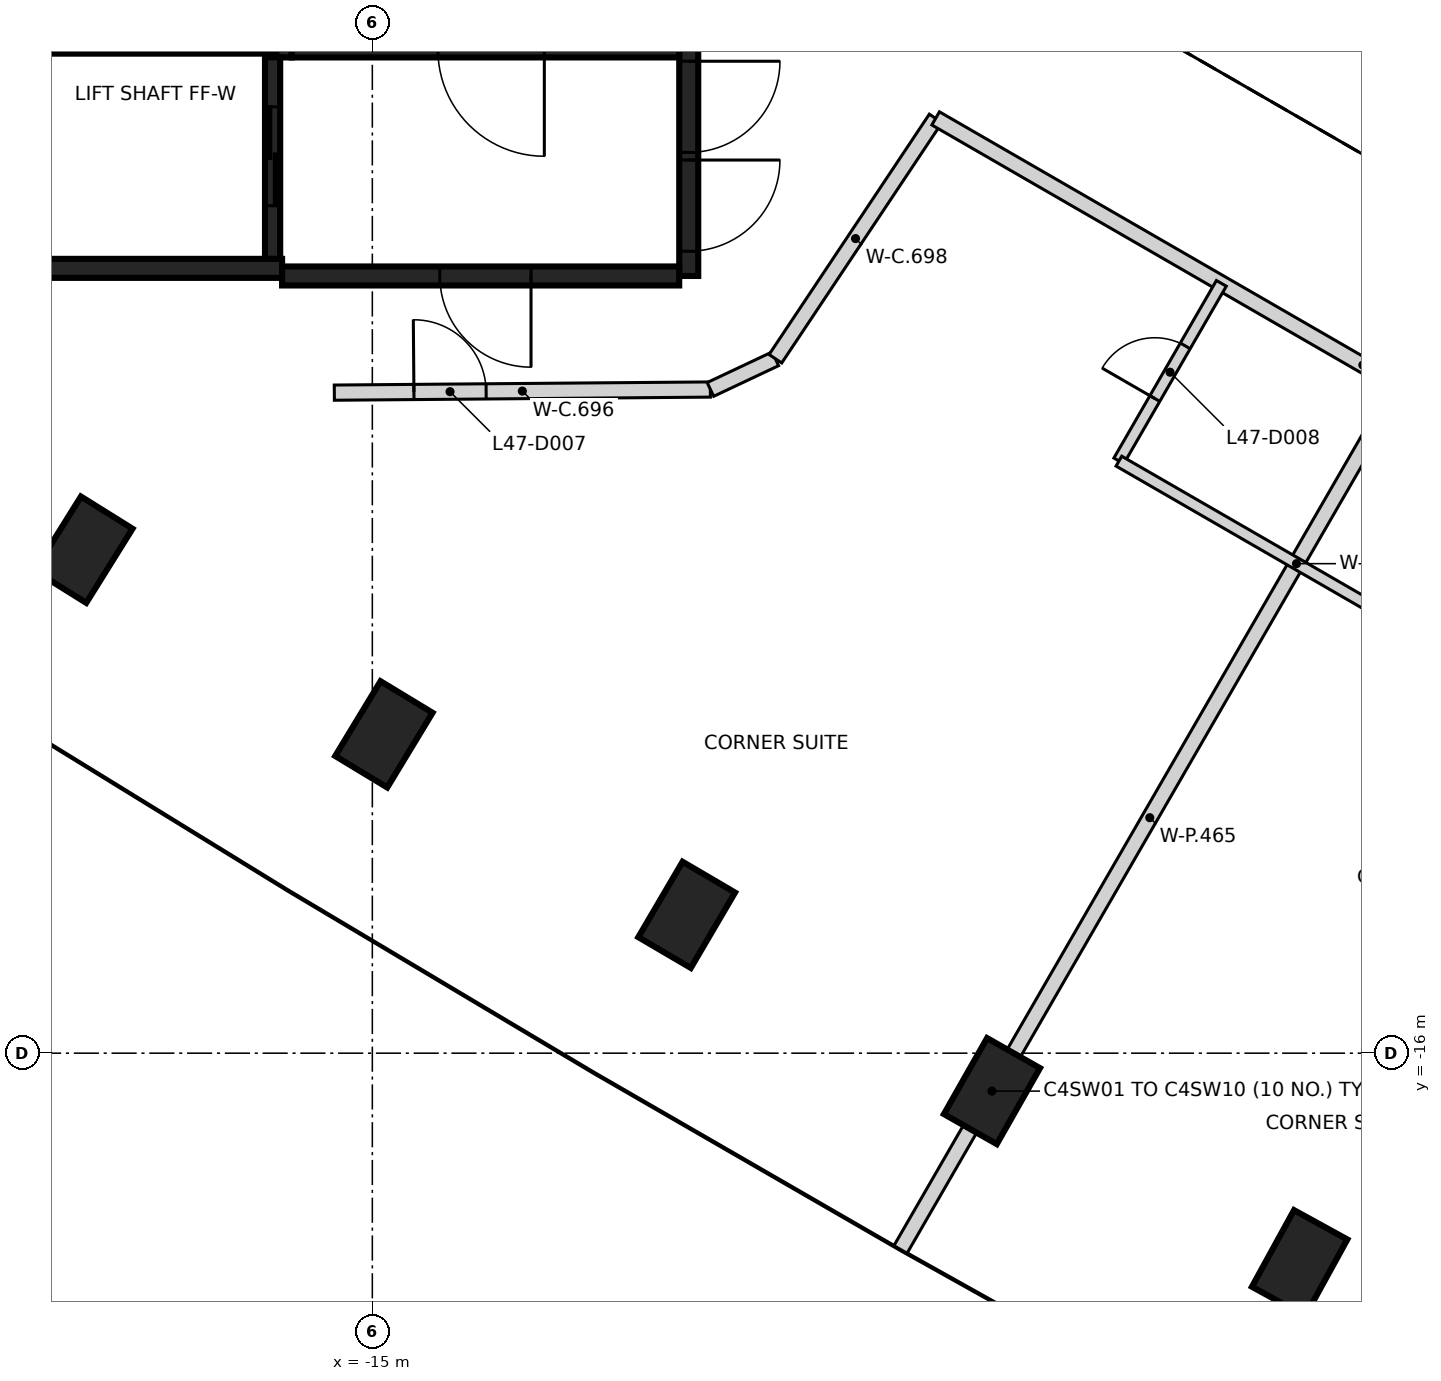
"""IFC4 building model, lengths in metres.
Left out: names, types, materials, properties, quantities, classifications, styles, units other than length and angle.
Written with IfcOpenShell. Run it as: python <this file> out.ifc"""

import sys

from ifc_helpers import new_model, si_unit, direction, frame, frame_2d, origin, origin_2d, place, context, subcontext, project, spatial, rectangle, extrude, element, fill, save


model = new_model("IFC4")
c1 = context("Model", 3, precision=1e-05, world=origin(), true_north=direction((0.0, 1.0)))
c2 = subcontext(c1, "Body", "Model", "MODEL_VIEW")
j1 = project(units=[si_unit("LENGTHUNIT", "METRE"), si_unit("PLANEANGLEUNIT", "RADIAN")], contexts=[c1])
p1 = place(None, origin())
s1 = spatial("IfcSite", under=j1, at=p1, CompositionType="ELEMENT")
p2 = place(p1, origin())
s2 = spatial("IfcBuilding", under=s1, at=p2, CompositionType="ELEMENT")
p3 = place(p2, frame((0.0, 0.0, 190.0)))
s3 = spatial("IfcBuildingStorey", under=s2, at=p3, CompositionType="ELEMENT", Elevation=190.0)
for number, where, z_axis, x_axis in (
    (1, (-18.799, -9.376, -0.35), (0.0, 0.0, 1.0), (0.529, 0.848, 0.0)),
    (2, (-14.848, -11.806, -0.35), (0.0, 0.0, 1.0), (0.518, 0.855, 0.0)),
    (3, (-10.864, -14.18, -0.35), (0.0, 0.0, 1.0), (0.506, 0.862, 0.0)),
    (4, (-6.848, -16.499, -0.35), (0.0, 0.0, 1.0), (0.494, 0.87, 0.0)),
    (5, (-2.8, -18.762, -0.35), (0.0, 0.0, 1.0), (0.482, 0.876, 0.0)),
):
    element("IfcColumn", number, at=place(p3, frame(where, z_axis=z_axis, x_axis=x_axis)), inside=s3, PredefinedType="COLUMN", context=c2, shape_type="SweptSolid", body=[
        extrude(rectangle(XDim=1.15, YDim=0.8, at=origin_2d()), origin(), (0.0, 0.0, 1.0), 3.6),
    ])
p4 = place(p3, frame((-10.837, 5.775, 0.0), z_axis=(0.0, 0.0, 1.0), x_axis=(0.0, -1.0, 0.0)))
e6 = element("IfcWall", 6, at=p4, inside=s3, PredefinedType="SHEAR", context=c2, shape_type="SweptSolid", body=[
    extrude(rectangle(XDim=11.55, YDim=0.25, at=frame_2d((5.775, 0.0))), origin(), (0.0, 0.0, 1.0), 3.25),
])
p5 = place(p4, frame((10.025, 0.0, 0.0)))
e7 = element("IfcOpeningElement", 7, at=p5, cuts=e6, PredefinedType="OPENING", context=c2, shape_type="SweptSolid", body=[
    extrude(rectangle(XDim=1.2, YDim=2.1, at=frame_2d((0.6, 1.05))), frame((0.0, 0.135, 0.0), z_axis=(0.0, -1.0, 0.0), x_axis=(1.0, 0.0, 0.0)), (0.0, 0.0, 1.0), 0.27),
])
p6 = place(p4, frame((8.725, 0.0, 0.0)))
e8 = element("IfcOpeningElement", 8, at=p6, cuts=e6, PredefinedType="OPENING", context=c2, shape_type="SweptSolid", body=[
    extrude(rectangle(XDim=1.2, YDim=2.1, at=frame_2d((0.6, 1.05))), frame((0.0, 0.135, 0.0), z_axis=(0.0, -1.0, 0.0), x_axis=(1.0, 0.0, 0.0)), (0.0, 0.0, 1.0), 0.27),
])
p7 = place(p3, frame((-16.187, -5.675, 0.0), z_axis=(0.0, 0.0, 1.0), x_axis=(-1.0, 0.0, 0.0)))
e9 = element("IfcWall", 9, at=p7, inside=s3, PredefinedType="SHEAR", context=c2, shape_type="SweptSolid", body=[
    extrude(rectangle(XDim=6.125, YDim=0.25, at=frame_2d((3.062, 0.0))), origin(), (0.0, 0.0, 1.0), 3.25),
])
p8 = place(p7, frame((3.563, 0.0, 0.0)))
e10 = element("IfcOpeningElement", 10, at=p8, cuts=e9, PredefinedType="OPENING", context=c2, shape_type="SweptSolid", body=[
    extrude(rectangle(XDim=1.0, YDim=2.1, at=frame_2d((0.5, 1.05))), frame((0.0, 0.135, 0.0), z_axis=(0.0, -1.0, 0.0), x_axis=(1.0, 0.0, 0.0)), (0.0, 0.0, 1.0), 0.27),
])
p9 = place(p3, frame((-10.963, -5.775, 0.0), z_axis=(0.0, 0.0, 1.0), x_axis=(-1.0, 0.0, 0.0)))
e11 = element("IfcWall", 11, at=p9, inside=s3, PredefinedType="SHEAR", context=c2, shape_type="SweptSolid", body=[
    extrude(rectangle(XDim=5.225, YDim=0.25, at=frame_2d((2.612, 0.0))), origin(), (0.0, 0.0, 1.0), 3.25),
])
p10 = place(p9, frame((1.95, 0.0, 0.0)))
e12 = element("IfcOpeningElement", 12, at=p10, cuts=e11, PredefinedType="OPENING", context=c2, shape_type="SweptSolid", body=[
    extrude(rectangle(XDim=1.2, YDim=2.1, at=frame_2d((0.6, 1.05))), frame((0.0, 0.135, 0.0), z_axis=(0.0, -1.0, 0.0), x_axis=(1.0, 0.0, 0.0)), (0.0, 0.0, 1.0), 0.27),
])
p11 = place(p3, frame((-16.162, 3.074, 0.0), z_axis=(0.0, 0.0, 1.0), x_axis=(0.0, -1.0, 0.0)))
e13 = element("IfcWall", 13, at=p11, inside=s3, PredefinedType="SHEAR", context=c2, shape_type="SweptSolid", body=[
    extrude(rectangle(XDim=5.974, YDim=0.2, at=frame_2d((2.987, 0.0))), origin(), (0.0, 0.0, 1.0), 3.25),
])
p12 = place(p3, frame((-10.963, -2.8, 0.0), z_axis=(0.0, 0.0, 1.0), x_axis=(-1.0, 0.0, 0.0)))
e14 = element("IfcWall", 14, at=p12, inside=s3, PredefinedType="SHEAR", context=c2, shape_type="SweptSolid", body=[
    extrude(rectangle(XDim=5.098, YDim=0.2, at=frame_2d((2.549, 0.0))), origin(), (0.0, 0.0, 1.0), 3.25),
])
p13 = place(p12, frame((1.774, 0.0, 0.0)))
e15 = element("IfcOpeningElement", 15, at=p13, cuts=e14, PredefinedType="OPENING", context=c2, shape_type="SweptSolid", body=[
    extrude(rectangle(XDim=1.4, YDim=2.1, at=frame_2d((0.7, 1.05))), frame((0.0, 0.11, 0.0), z_axis=(0.0, -1.0, 0.0), x_axis=(1.0, 0.0, 0.0)), (0.0, 0.0, 1.0), 0.22),
])
p14 = place(p3, frame((-19.412, -2.75, 0.0), z_axis=(0.0, 0.0, 1.0), x_axis=(1.0, 0.0, 0.0)))
e16 = element("IfcWall", 16, at=p14, inside=s3, PredefinedType="SHEAR", context=c2, shape_type="SweptSolid", body=[
    extrude(rectangle(XDim=3.1, YDim=0.2, at=frame_2d((1.55, 0.0))), origin(), (0.0, 0.0, 1.0), 3.25),
])
p15 = place(p3, frame((-16.312, -2.898, 0.0), z_axis=(0.0, 0.0, 1.0), x_axis=(0.0, -1.0, 0.0)))
e17 = element("IfcWall", 17, at=p15, inside=s3, PredefinedType="SHEAR", context=c2, shape_type="SweptSolid", body=[
    extrude(rectangle(XDim=2.651, YDim=0.2, at=frame_2d((1.325, 0.0))), origin(), (0.0, 0.0, 1.0), 3.25),
])
p16 = place(p15, frame((0.652, 0.0, 0.0)))
e18 = element("IfcOpeningElement", 18, at=p16, cuts=e17, PredefinedType="OPENING", context=c2, shape_type="SweptSolid", body=[
    extrude(rectangle(XDim=1.3, YDim=2.1, at=frame_2d((0.65, 1.05))), frame((0.0, 0.11, 0.0), z_axis=(0.0, -1.0, 0.0), x_axis=(1.0, 0.0, 0.0)), (0.0, 0.0, 1.0), 0.22),
])
p17 = place(p3, frame((-15.5, -7.31, 0.0), z_axis=(0.0, 0.0, 1.0), x_axis=(0.999965631649, 0.008290688749, 0.0)))
e19 = element("IfcWall", 19, at=p17, inside=s3, PredefinedType="PARTITIONING", context=c2, shape_type="SweptSolid", body=[
    extrude(rectangle(XDim=4.947, YDim=0.2, at=frame_2d((2.474, 0.0))), origin(), (0.0, 0.0, 1.0), 3.25),
])
p18 = place(p17, frame((1.047, 0.0, 0.0)))
e20 = element("IfcOpeningElement", 20, at=p18, cuts=e19, PredefinedType="OPENING", context=c2, shape_type="SweptSolid", body=[
    extrude(rectangle(XDim=0.95, YDim=2.1, at=frame_2d((0.475, 1.05))), frame((0.0, 0.11, 0.0), z_axis=(0.0, -1.0, 0.0), x_axis=(1.0, 0.0, 0.0)), (0.0, 0.0, 1.0), 0.22),
])
p19 = place(p3, frame((-10.552, -7.268, 0.0), z_axis=(0.0, 0.0, 1.0), x_axis=(0.904331815333, 0.426830139255, 0.0)))
e21 = element("IfcWall", 21, at=p19, inside=s3, PredefinedType="PARTITIONING", context=c2, shape_type="SweptSolid", body=[
    extrude(rectangle(XDim=0.944, YDim=0.2, at=frame_2d((0.472, 0.0))), origin(), (0.0, 0.0, 1.0), 3.25),
])
p20 = place(p3, frame((-9.697, -6.864, 0.0), z_axis=(0.0, 0.0, 1.0), x_axis=(0.554670545446, 0.832070060761, 0.0)))
e22 = element("IfcWall", 22, at=p20, inside=s3, PredefinedType="PARTITIONING", context=c2, shape_type="SweptSolid", body=[
    extrude(rectangle(XDim=3.8, YDim=0.2, at=frame_2d((1.9, 0.0))), origin(), (0.0, 0.0, 1.0), 3.25),
])
p21 = place(p3, frame((-7.589, -3.702, 0.0), z_axis=(0.0, 0.0, 1.0), x_axis=(0.86602490244, -0.500000868353, 0.0)))
e23 = element("IfcWall", 23, at=p21, inside=s3, PredefinedType="PARTITIONING", context=c2, shape_type="SweptSolid", body=[
    extrude(rectangle(XDim=12.98, YDim=0.2, at=frame_2d((6.49, 0.0))), origin(), (0.0, 0.0, 1.0), 3.25),
])
p22 = place(p21, frame((11.8, 0.0, 0.0)))
e24 = element("IfcOpeningElement", 24, at=p22, cuts=e23, PredefinedType="OPENING", context=c2, shape_type="SweptSolid", body=[
    extrude(rectangle(XDim=0.95, YDim=2.1, at=frame_2d((0.475, 1.05))), frame((0.0, 0.11, 0.0), z_axis=(0.0, -1.0, 0.0), x_axis=(1.0, 0.0, 0.0)), (0.0, 0.0, 1.0), 0.22),
])
p23 = place(p3, frame((-8.051, -18.582, 0.0), z_axis=(0.0, 0.0, 1.0), x_axis=(0.500024249232, 0.866011403031, 0.0)))
e25 = element("IfcWall", 25, at=p23, inside=s3, PredefinedType="PARTITIONING", context=c2, shape_type="SweptSolid", body=[
    extrude(rectangle(XDim=13.118, YDim=0.2, at=frame_2d((6.559, 0.0))), origin(), (0.0, 0.0, 1.0), 3.25),
])
p24 = place(p3, frame((-5.179, -8.208, 0.0), z_axis=(0.0, 0.0, 1.0), x_axis=(0.500061949227, 0.865989634427, 0.0)))
e26 = element("IfcWall", 26, at=p24, inside=s3, PredefinedType="PARTITIONING", context=c2, shape_type="SweptSolid", body=[
    extrude(rectangle(XDim=2.698, YDim=0.15, at=frame_2d((1.349, 0.0))), origin(), (0.0, 0.0, 1.0), 3.25),
])
p25 = place(p24, frame((0.948, 0.0, 0.0)))
e27 = element("IfcOpeningElement", 27, at=p25, cuts=e26, PredefinedType="OPENING", context=c2, shape_type="SweptSolid", body=[
    extrude(rectangle(XDim=0.8, YDim=2.1, at=frame_2d((0.4, 1.05))), frame((0.0, 0.085, 0.0), z_axis=(0.0, -1.0, 0.0), x_axis=(1.0, 0.0, 0.0)), (0.0, 0.0, 1.0), 0.17),
])
p26 = place(p3, frame((-5.178, -8.211, 0.0), z_axis=(0.0, 0.0, 1.0), x_axis=(0.866046199912, -0.49996397832, 0.0)))
e28 = element("IfcWall", 28, at=p26, inside=s3, PredefinedType="PARTITIONING", context=c2, shape_type="SweptSolid", body=[
    extrude(rectangle(XDim=5.396, YDim=0.15, at=frame_2d((2.698, 0.0))), origin(), (0.0, 0.0, 1.0), 3.25),
])
p27 = place(p16, origin())
e29 = element("IfcDoor", 29, at=p27, inside=s3, OperationType="SLIDING_TO_RIGHT", PredefinedType="DOOR", context=c2, shape_type="SweptSolid", body=[
    extrude(rectangle(XDim=1.3, YDim=2.1, at=frame_2d((0.65, 1.05))), frame((0.0, 0.025, 0.0), z_axis=(0.0, -1.0, 0.0), x_axis=(1.0, 0.0, 0.0)), (0.0, 0.0, 1.0), 0.05),
])
fill(e18, e29)
p28 = place(p5, origin())
e30 = element("IfcDoor", 30, at=p28, inside=s3, OperationType="SINGLE_SWING_LEFT", PredefinedType="DOOR", context=c2, shape_type="SweptSolid", body=[
    extrude(rectangle(XDim=1.2, YDim=2.1, at=frame_2d((0.6, 1.05))), frame((0.0, 0.025, 0.0), z_axis=(0.0, -1.0, 0.0), x_axis=(1.0, 0.0, 0.0)), (0.0, 0.0, 1.0), 0.05),
])
fill(e7, e30)
p29 = place(p6, origin())
e31 = element("IfcDoor", 31, at=p29, inside=s3, OperationType="SINGLE_SWING_RIGHT", PredefinedType="DOOR", context=c2, shape_type="SweptSolid", body=[
    extrude(rectangle(XDim=1.2, YDim=2.1, at=frame_2d((0.6, 1.05))), frame((0.0, 0.025, 0.0), z_axis=(0.0, -1.0, 0.0), x_axis=(1.0, 0.0, 0.0)), (0.0, 0.0, 1.0), 0.05),
])
fill(e8, e31)
p30 = place(p10, origin())
e32 = element("IfcDoor", 32, at=p30, inside=s3, OperationType="SINGLE_SWING_LEFT", PredefinedType="DOOR", context=c2, shape_type="SweptSolid", body=[
    extrude(rectangle(XDim=1.2, YDim=2.1, at=frame_2d((0.6, 1.05))), frame((0.0, 0.025, 0.0), z_axis=(0.0, -1.0, 0.0), x_axis=(1.0, 0.0, 0.0)), (0.0, 0.0, 1.0), 0.05),
])
fill(e12, e32)
p31 = place(p18, frame((0.95, 0.0, 0.0), z_axis=(0.0, 0.0, 1.0), x_axis=(-1.0, 0.0, 0.0)))
e33 = element("IfcDoor", 33, at=p31, inside=s3, OperationType="SINGLE_SWING_LEFT", PredefinedType="DOOR", context=c2, shape_type="SweptSolid", body=[
    extrude(rectangle(XDim=0.95, YDim=2.1, at=frame_2d((0.475, 1.05))), frame((0.0, 0.025, 0.0), z_axis=(0.0, -1.0, 0.0), x_axis=(1.0, 0.0, 0.0)), (0.0, 0.0, 1.0), 0.05),
])
fill(e20, e33)
p32 = place(p25, origin())
e34 = element("IfcDoor", 34, at=p32, inside=s3, OperationType="SINGLE_SWING_LEFT", PredefinedType="DOOR", context=c2, shape_type="SweptSolid", body=[
    extrude(rectangle(XDim=0.8, YDim=2.1, at=frame_2d((0.4, 1.05))), frame((0.0, 0.025, 0.0), z_axis=(0.0, -1.0, 0.0), x_axis=(1.0, 0.0, 0.0)), (0.0, 0.0, 1.0), 0.05),
])
fill(e27, e34)
save(model, sys.argv[1])
